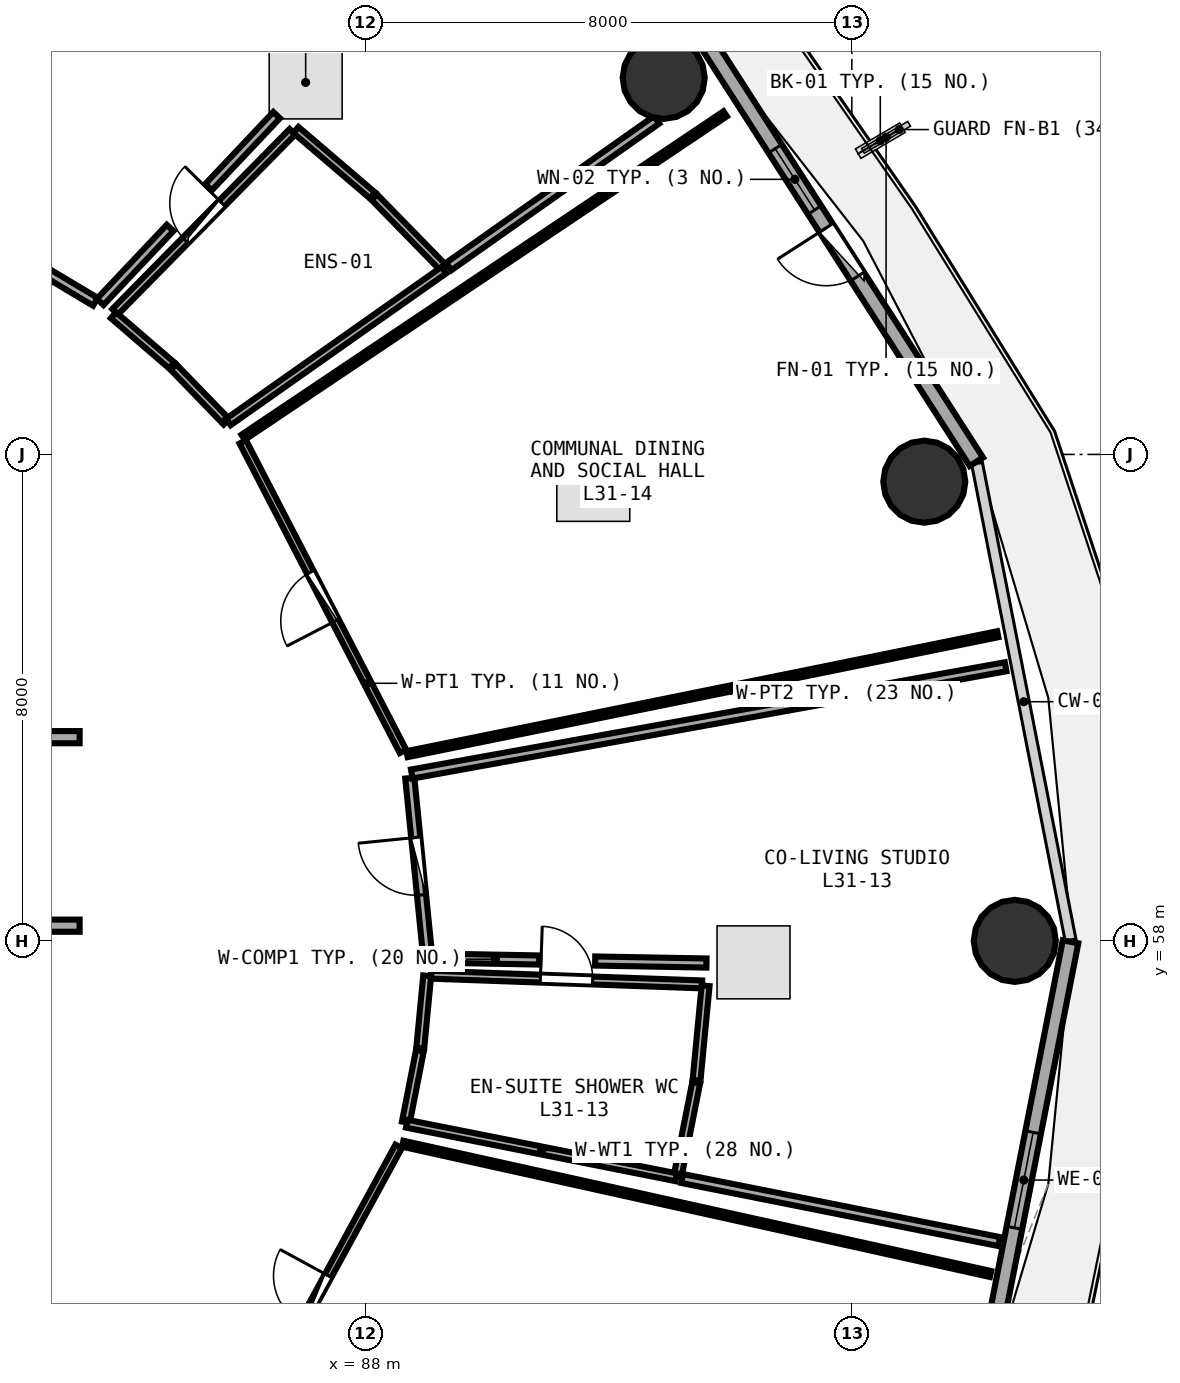
"""IFC4 building model, lengths in metres.
Left out: names, types, materials, properties, quantities, classifications, styles, units other than length and angle.
Written with IfcOpenShell. Run it as: python <this file> out.ifc"""

import sys

from ifc_helpers import new_model, si_unit, direction, frame, frame_2d, origin, origin_2d, place, context, subcontext, project, spatial, rectangle, circle, extrude, element, fill, save


model = new_model("IFC4")
c1 = context("Model", 3, precision=1e-05, world=origin(), true_north=direction((0.0, 1.0)))
c2 = subcontext(c1, "Body", "Model", "MODEL_VIEW")
j1 = project(units=[si_unit("LENGTHUNIT", "METRE"), si_unit("PLANEANGLEUNIT", "RADIAN")], contexts=[c1])
p1 = place(None, origin())
s1 = spatial("IfcSite", under=j1, at=p1, CompositionType="ELEMENT")
p2 = place(p1, origin())
s2 = spatial("IfcBuilding", under=s1, at=p2, CompositionType="ELEMENT")
p3 = place(p2, frame((0.0, 0.0, 121.35)))
s3 = spatial("IfcBuildingStorey", under=s2, at=p3, CompositionType="ELEMENT", Elevation=121.35)
for number, where, z_axis, x_axis in (
    (1, (98.68, 58.0, 0.0), (0.0, 0.0, 1.0), (1.0, 0.0, 0.0)),
    (2, (97.192, 65.552, 0.0), (0.0, 0.0, 1.0), (1.0, 0.0, 0.0)),
    (3, (92.906, 72.193, 0.0), (0.0, 0.0, 1.0), (1.0, 0.0, 0.0)),
):
    element("IfcColumn", number, at=place(p3, frame(where, z_axis=z_axis, x_axis=x_axis)), inside=s3, PredefinedType="COLUMN", context=c2, shape_type="SweptSolid", body=[
        extrude(circle(Radius=0.675, at=origin_2d()), origin(), (0.0, 0.0, 1.0), 3.75),
    ])
p4 = place(p3, frame((98.048, 65.879, 0.0), z_axis=(0.0, 0.0, 1.0), x_axis=(-0.540620528459, 0.841266571432, 0.0)))
e4 = element("IfcWall", 4, at=p4, inside=s3, PredefinedType="SOLIDWALL", context=c2, shape_type="SweptSolid", body=[
    extrude(rectangle(XDim=8.193, YDim=0.26, at=frame_2d((4.096, 0.0))), origin(), (0.0, 0.0, 1.0), 3.475),
])
p5 = place(p4, frame((3.621, 0.0, 0.0)))
e5 = element("IfcOpeningElement", 5, at=p5, cuts=e4, PredefinedType="OPENING", context=c2, shape_type="SweptSolid", body=[
    extrude(rectangle(XDim=0.95, YDim=2.1, at=frame_2d((0.475, 1.05))), frame((0.0, 0.14, 0.0), z_axis=(0.0, -1.0, 0.0), x_axis=(1.0, 0.0, 0.0)), (0.0, 0.0, 1.0), 0.28),
])
p6 = place(p4, frame((4.921, 0.0, 0.85)))
e6 = element("IfcOpeningElement", 6, at=p6, cuts=e4, PredefinedType="OPENING", context=c2, shape_type="SweptSolid", body=[
    extrude(rectangle(XDim=1.2, YDim=1.45, at=frame_2d((0.6, 0.725))), frame((0.0, 0.14, 0.0), z_axis=(0.0, -1.0, 0.0), x_axis=(1.0, 0.0, 0.0)), (0.0, 0.0, 1.0), 0.28),
])
p7 = place(p3, frame((98.059, 50.148, 0.0), z_axis=(0.0, 0.0, 1.0), x_axis=(0.192581843632, 0.981280914674, 0.0)))
e7 = element("IfcWall", 7, at=p7, inside=s3, PredefinedType="SOLIDWALL", context=c2, shape_type="SweptSolid", body=[
    extrude(rectangle(XDim=7.987, YDim=0.26, at=frame_2d((3.993, 0.0))), origin(), (0.0, 0.0, 1.0), 3.475),
])
p8 = place(p7, frame((3.193, 0.0, 0.85)))
e8 = element("IfcOpeningElement", 8, at=p8, cuts=e7, PredefinedType="OPENING", context=c2, shape_type="SweptSolid", body=[
    extrude(rectangle(XDim=1.6, YDim=1.45, at=frame_2d((0.8, 0.725))), frame((0.0, 0.14, 0.0), z_axis=(0.0, -1.0, 0.0), x_axis=(1.0, 0.0, 0.0)), (0.0, 0.0, 1.0), 0.28),
])
p9 = place(p3, frame((79.3, 61.35, 0.0), z_axis=(0.0, 0.0, 1.0), x_axis=(1.0, 0.0, 0.0)))
e9 = element("IfcWall", 9, at=p9, inside=s3, PredefinedType="SOLIDWALL", context=c2, shape_type="SweptSolid", body=[
    extrude(rectangle(XDim=4.0, YDim=0.2, at=frame_2d((2.0, 0.0))), origin(), (0.0, 0.0, 1.0), 2.775),
])
p10 = place(p9, frame((0.45, 0.0, 0.0)))
e10 = element("IfcOpeningElement", 10, at=p10, cuts=e9, PredefinedType="OPENING", context=c2, shape_type="SweptSolid", body=[
    extrude(rectangle(XDim=1.2, YDim=2.15, at=frame_2d((0.6, 1.075))), frame((0.0, 0.11, 0.0), z_axis=(0.0, -1.0, 0.0), x_axis=(1.0, 0.0, 0.0)), (0.0, 0.0, 1.0), 0.22),
])
p11 = place(p3, frame((79.3, 58.25, 0.0), z_axis=(0.0, 0.0, 1.0), x_axis=(1.0, 0.0, 0.0)))
e11 = element("IfcWall", 11, at=p11, inside=s3, PredefinedType="SOLIDWALL", context=c2, shape_type="SweptSolid", body=[
    extrude(rectangle(XDim=4.0, YDim=0.2, at=frame_2d((2.0, 0.0))), origin(), (0.0, 0.0, 1.0), 2.775),
])
p12 = place(p11, frame((0.5, 0.0, 0.0)))
e12 = element("IfcOpeningElement", 12, at=p12, cuts=e11, PredefinedType="OPENING", context=c2, shape_type="SweptSolid", body=[
    extrude(rectangle(XDim=1.1, YDim=2.1, at=frame_2d((0.55, 1.05))), frame((0.0, 0.11, 0.0), z_axis=(0.0, -1.0, 0.0), x_axis=(1.0, 0.0, 0.0)), (0.0, 0.0, 1.0), 0.22),
])
p13 = place(p3, frame((83.883, 68.345, 0.0), z_axis=(0.0, 0.0, 1.0), x_axis=(0.70168270288, 0.712489567979, 0.0)))
e13 = element("IfcWall", 13, at=p13, inside=s3, PredefinedType="PLUMBINGWALL", context=c2, shape_type="SweptSolid", body=[
    extrude(rectangle(XDim=4.157, YDim=0.13, at=frame_2d((2.078, 0.0))), origin(), (0.0, 0.0, 1.0), 3.175),
])
p14 = place(p13, frame((1.648, 0.0, 0.0)))
e14 = element("IfcOpeningElement", 14, at=p14, cuts=e13, PredefinedType="OPENING", context=c2, shape_type="SweptSolid", body=[
    extrude(rectangle(XDim=0.86, YDim=2.05, at=frame_2d((0.43, 1.025))), frame((0.0, 0.075, 0.0), z_axis=(0.0, -1.0, 0.0), x_axis=(1.0, 0.0, 0.0)), (0.0, 0.0, 1.0), 0.15),
])
p15 = place(p3, frame((83.56, 68.51, 0.0), z_axis=(0.0, 0.0, 1.0), x_axis=(-0.858523244826, 0.512774646501, 0.0)))
e15 = element("IfcWall", 15, at=p15, inside=s3, PredefinedType="PARTITIONING", context=c2, shape_type="SweptSolid", body=[
    extrude(rectangle(XDim=3.131, YDim=0.15, at=frame_2d((1.565, 0.0))), origin(), (0.0, 0.0, 1.0), 2.925),
])
p16 = place(p15, frame((1.09, 0.0, 0.0)))
e16 = element("IfcOpeningElement", 16, at=p16, cuts=e15, PredefinedType="OPENING", context=c2, shape_type="SweptSolid", body=[
    extrude(rectangle(XDim=0.95, YDim=2.08, at=frame_2d((0.475, 1.04))), frame((0.0, 0.085, 0.0), z_axis=(0.0, -1.0, 0.0), x_axis=(1.0, 0.0, 0.0)), (0.0, 0.0, 1.0), 0.17),
])
p17 = place(p3, frame((85.801, 49.579, 0.0), z_axis=(0.0, 0.0, 1.0), x_axis=(0.478256103777, 0.878220416069, 0.0)))
e17 = element("IfcWall", 17, at=p17, inside=s3, PredefinedType="PARTITIONING", context=c2, shape_type="SweptSolid", body=[
    extrude(rectangle(XDim=5.741, YDim=0.12, at=frame_2d((2.871, 0.0))), origin(), (0.0, 0.0, 1.0), 2.925),
])
p18 = place(p17, frame((2.42, 0.0, 0.0)))
e18 = element("IfcOpeningElement", 18, at=p18, cuts=e17, PredefinedType="OPENING", context=c2, shape_type="SweptSolid", body=[
    extrude(rectangle(XDim=0.9, YDim=2.08, at=frame_2d((0.45, 1.04))), frame((0.0, 0.07, 0.0), z_axis=(0.0, -1.0, 0.0), x_axis=(1.0, 0.0, 0.0)), (0.0, 0.0, 1.0), 0.14),
])
p19 = place(p3, frame((89.078, 57.444, 0.0), z_axis=(0.0, 0.0, 1.0), x_axis=(0.999359574241, -0.035783255492, 0.0)))
e19 = element("IfcWall", 19, at=p19, inside=s3, PredefinedType="PLUMBINGWALL", context=c2, shape_type="SweptSolid", body=[
    extrude(rectangle(XDim=4.462, YDim=0.13, at=frame_2d((2.231, 0.0))), origin(), (0.0, 0.0, 1.0), 3.175),
])
p20 = place(p19, frame((1.801, 0.0, 0.0)))
e20 = element("IfcOpeningElement", 20, at=p20, cuts=e19, PredefinedType="OPENING", context=c2, shape_type="SweptSolid", body=[
    extrude(rectangle(XDim=0.86, YDim=2.05, at=frame_2d((0.43, 1.025))), frame((0.0, 0.075, 0.0), z_axis=(0.0, -1.0, 0.0), x_axis=(1.0, 0.0, 0.0)), (0.0, 0.0, 1.0), 0.15),
])
p21 = place(p3, frame((89.021, 57.779, 0.0), z_axis=(0.0, 0.0, 1.0), x_axis=(-0.099902017985, 0.994997279797, 0.0)))
e21 = element("IfcWall", 21, at=p21, inside=s3, PredefinedType="PARTITIONING", context=c2, shape_type="SweptSolid", body=[
    extrude(rectangle(XDim=2.913, YDim=0.15, at=frame_2d((1.457, 0.0))), origin(), (0.0, 0.0, 1.0), 2.925),
])
p22 = place(p21, frame((0.982, 0.0, 0.0)))
e22 = element("IfcOpeningElement", 22, at=p22, cuts=e21, PredefinedType="OPENING", context=c2, shape_type="SweptSolid", body=[
    extrude(rectangle(XDim=0.95, YDim=2.08, at=frame_2d((0.475, 1.04))), frame((0.0, 0.085, 0.0), z_axis=(0.0, -1.0, 0.0), x_axis=(1.0, 0.0, 0.0)), (0.0, 0.0, 1.0), 0.17),
])
p23 = place(p3, frame((88.618, 61.116, 0.0), z_axis=(0.0, 0.0, 1.0), x_axis=(-0.459658120373, 0.88809594773, 0.0)))
e23 = element("IfcWall", 23, at=p23, inside=s3, PredefinedType="PARTITIONING", context=c2, shape_type="SweptSolid", body=[
    extrude(rectangle(XDim=5.732, YDim=0.12, at=frame_2d((2.866, 0.0))), origin(), (0.0, 0.0, 1.0), 2.925),
])
p24 = place(p23, frame((2.416, 0.0, 0.0)))
e24 = element("IfcOpeningElement", 24, at=p24, cuts=e23, PredefinedType="OPENING", context=c2, shape_type="SweptSolid", body=[
    extrude(rectangle(XDim=0.9, YDim=2.08, at=frame_2d((0.45, 1.04))), frame((0.0, 0.07, 0.0), z_axis=(0.0, -1.0, 0.0), x_axis=(1.0, 0.0, 0.0)), (0.0, 0.0, 1.0), 0.14),
])
p25 = place(p3, frame((85.716, 66.536, 0.0), z_axis=(0.0, 0.0, 1.0), x_axis=(-0.695817197704, 0.718218927194, 0.0)))
e25 = element("IfcWall", 25, at=p25, inside=s3, PredefinedType="PLUMBINGWALL", context=c2, shape_type="SweptSolid", body=[
    extrude(rectangle(XDim=1.253, YDim=0.13, at=frame_2d((0.627, 0.0))), origin(), (0.0, 0.0, 1.0), 2.925),
])
p26 = place(p3, frame((84.815, 67.464, 0.0), z_axis=(0.0, 0.0, 1.0), x_axis=(-0.757933178543, 0.652332198242, 0.0)))
e26 = element("IfcWall", 26, at=p26, inside=s3, PredefinedType="PLUMBINGWALL", context=c2, shape_type="SweptSolid", body=[
    extrude(rectangle(XDim=1.265, YDim=0.13, at=frame_2d((0.632, 0.0))), origin(), (0.0, 0.0, 1.0), 3.48),
])
p27 = place(p3, frame((86.857, 71.336, 0.0), z_axis=(0.0, 0.0, 1.0), x_axis=(0.760056789813, -0.649856658241, 0.0)))
e27 = element("IfcWall", 27, at=p27, inside=s3, PredefinedType="PLUMBINGWALL", context=c2, shape_type="SweptSolid", body=[
    extrude(rectangle(XDim=1.657, YDim=0.13, at=frame_2d((0.829, 0.0))), origin(), (0.0, 0.0, 1.0), 3.48),
])
p28 = place(p3, frame((88.146, 70.232, 0.0), z_axis=(0.0, 0.0, 1.0), x_axis=(0.698431593966, -0.715676818508, 0.0)))
e28 = element("IfcWall", 28, at=p28, inside=s3, PredefinedType="PLUMBINGWALL", context=c2, shape_type="SweptSolid", body=[
    extrude(rectangle(XDim=1.642, YDim=0.13, at=frame_2d((0.821, 0.0))), origin(), (0.0, 0.0, 1.0), 2.925),
])
p29 = place(p3, frame((89.291, 69.031, 0.0), z_axis=(0.0, 0.0, 1.0), x_axis=(-0.817498099131, -0.575931296178, 0.0)))
e29 = element("IfcWall", 29, at=p29, inside=s3, PredefinedType="PLUMBINGWALL", context=c2, shape_type="SweptSolid", body=[
    extrude(rectangle(XDim=4.336, YDim=0.13, at=frame_2d((2.168, 0.0))), origin(), (0.0, 0.0, 1.0), 3.175),
])
p30 = place(p3, frame((80.84, 70.181, 0.0), z_axis=(0.0, 0.0, 1.0), x_axis=(0.500668535271, 0.865639080558, 0.0)))
e30 = element("IfcWall", 30, at=p30, inside=s3, PredefinedType="PARTITIONING", context=c2, shape_type="SweptSolid", body=[
    extrude(rectangle(XDim=9.03, YDim=0.15, at=frame_2d((4.515, 0.0))), origin(), (0.0, 0.0, 1.0), 2.925),
])
p31 = place(p3, frame((92.79, 71.502, 0.0), z_axis=(0.0, 0.0, 1.0), x_axis=(-0.817102044885, -0.576493060015, 0.0)))
e31 = element("IfcWall", 31, at=p31, inside=s3, PredefinedType="PARTITIONING", context=c2, shape_type="SweptSolid", body=[
    extrude(rectangle(XDim=4.185, YDim=0.15, at=frame_2d((2.092, 0.0))), origin(), (0.0, 0.0, 1.0), 3.235),
])
p32 = place(p3, frame((86.54, 71.58, 0.0), z_axis=(0.0, 0.0, 1.0), x_axis=(-0.68661474407, -0.727021453071, 0.0)))
e32 = element("IfcWall", 32, at=p32, inside=s3, PredefinedType="PARTITIONING", context=c2, shape_type="SweptSolid", body=[
    extrude(rectangle(XDim=1.631, YDim=0.15, at=frame_2d((0.816, 0.0))), origin(), (0.0, 0.0, 1.0), 3.175),
])
p33 = place(p3, frame((84.788, 69.725, 0.0), z_axis=(0.0, 0.0, 1.0), x_axis=(-0.686614966265, -0.727021243226, 0.0)))
e33 = element("IfcWall", 33, at=p33, inside=s3, PredefinedType="PARTITIONING", context=c2, shape_type="SweptSolid", body=[
    extrude(rectangle(XDim=1.674, YDim=0.15, at=frame_2d((0.837, 0.0))), origin(), (0.0, 0.0, 1.0), 3.235),
])
p34 = place(p3, frame((84.812, 78.241, 0.0), z_axis=(0.0, 0.0, 1.0), x_axis=(-0.477645693392, -0.878552554822, 0.0)))
e34 = element("IfcWall", 34, at=p34, inside=s3, PredefinedType="PARTITIONING", context=c2, shape_type="SweptSolid", body=[
    extrude(rectangle(XDim=9.007, YDim=0.1, at=frame_2d((4.503, 0.0))), origin(), (0.0, 0.0, 1.0), 2.925),
])
p35 = place(p3, frame((88.614, 54.664, 0.0), z_axis=(0.0, 0.0, 1.0), x_axis=(0.976312199438, -0.216366562178, 0.0)))
e35 = element("IfcWall", 35, at=p35, inside=s3, PredefinedType="PARTITIONING", context=c2, shape_type="SweptSolid", body=[
    extrude(rectangle(XDim=9.903, YDim=0.1, at=frame_2d((4.951, 0.0))), origin(), (0.0, 0.0, 1.0), 2.975),
])
p36 = place(p3, frame((88.665, 55.017, 0.0), z_axis=(0.0, 0.0, 1.0), x_axis=(0.192633384292, 0.981270798127, 0.0)))
e36 = element("IfcWall", 36, at=p36, inside=s3, PredefinedType="PLUMBINGWALL", context=c2, shape_type="SweptSolid", body=[
    extrude(rectangle(XDim=1.2, YDim=0.13, at=frame_2d((0.6, 0.0))), origin(), (0.0, 0.0, 1.0), 3.48),
])
p37 = place(p3, frame((88.902, 56.234, 0.0), z_axis=(0.0, 0.0, 1.0), x_axis=(0.095405531976, 0.995438488541, 0.0)))
e37 = element("IfcWall", 37, at=p37, inside=s3, PredefinedType="PLUMBINGWALL", context=c2, shape_type="SweptSolid", body=[
    extrude(rectangle(XDim=1.198, YDim=0.13, at=frame_2d((0.599, 0.0))), origin(), (0.0, 0.0, 1.0), 3.48),
])
p38 = place(p3, frame((93.595, 57.262, 0.0), z_axis=(0.0, 0.0, 1.0), x_axis=(-0.095560666353, -0.995423607841, 0.0)))
e38 = element("IfcWall", 38, at=p38, inside=s3, PredefinedType="PLUMBINGWALL", context=c2, shape_type="SweptSolid", body=[
    extrude(rectangle(XDim=1.563, YDim=0.13, at=frame_2d((0.782, 0.0))), origin(), (0.0, 0.0, 1.0), 3.48),
])
p39 = place(p3, frame((93.44, 55.667, 0.0), z_axis=(0.0, 0.0, 1.0), x_axis=(-0.194648564843, -0.980873047955, 0.0)))
e39 = element("IfcWall", 39, at=p39, inside=s3, PredefinedType="PLUMBINGWALL", context=c2, shape_type="SweptSolid", body=[
    extrude(rectangle(XDim=1.568, YDim=0.13, at=frame_2d((0.784, 0.0))), origin(), (0.0, 0.0, 1.0), 3.48),
])
p40 = place(p3, frame((93.111, 54.113, 0.0), z_axis=(0.0, 0.0, 1.0), x_axis=(-0.980825194025, 0.194889555304, 0.0)))
e40 = element("IfcWall", 40, at=p40, inside=s3, PredefinedType="PLUMBINGWALL", context=c2, shape_type="SweptSolid", body=[
    extrude(rectangle(XDim=4.517, YDim=0.13, at=frame_2d((2.259, 0.0))), origin(), (0.0, 0.0, 1.0), 3.175),
])
p41 = place(p3, frame((88.763, 60.744, 0.0), z_axis=(0.0, 0.0, 1.0), x_axis=(0.984081766615, 0.177716281237, 0.0)))
e41 = element("IfcWall", 41, at=p41, inside=s3, PredefinedType="PARTITIONING", context=c2, shape_type="SweptSolid", body=[
    extrude(rectangle(XDim=9.924, YDim=0.15, at=frame_2d((4.962, 0.0))), origin(), (0.0, 0.0, 1.0), 2.975),
])
p42 = place(p3, frame((98.425, 53.055, 0.0), z_axis=(0.0, 0.0, 1.0), x_axis=(-0.980779700981, 0.195118369572, 0.0)))
e42 = element("IfcWall", 42, at=p42, inside=s3, PredefinedType="PARTITIONING", context=c2, shape_type="SweptSolid", body=[
    extrude(rectangle(XDim=5.318, YDim=0.15, at=frame_2d((2.659, 0.0))), origin(), (0.0, 0.0, 1.0), 2.975),
])
p43 = place(p3, frame((93.609, 57.636, 0.0), z_axis=(0.0, 0.0, 1.0), x_axis=(-0.999835456222, 0.018140024286, 0.0)))
e43 = element("IfcWall", 43, at=p43, inside=s3, PredefinedType="PARTITIONING", context=c2, shape_type="SweptSolid", body=[
    extrude(rectangle(XDim=1.83, YDim=0.15, at=frame_2d((0.915, 0.0))), origin(), (0.0, 0.0, 1.0), 3.175),
])
p44 = place(p3, frame((90.859, 57.686, 0.0), z_axis=(0.0, 0.0, 1.0), x_axis=(-0.999835980019, 0.018111130838, 0.0)))
e44 = element("IfcWall", 44, at=p44, inside=s3, PredefinedType="PARTITIONING", context=c2, shape_type="SweptSolid", body=[
    extrude(rectangle(XDim=1.442, YDim=0.15, at=frame_2d((0.721, 0.0))), origin(), (0.0, 0.0, 1.0), 3.48),
])
p45 = place(p3, frame((85.989, 66.282, 0.0), z_axis=(0.0, 0.0, 1.0), x_axis=(0.830433607217, 0.557117603388, 0.0)))
e45 = element("IfcWall", 45, at=p45, inside=s3, PredefinedType="PARTITIONING", context=c2, shape_type="SweptSolid", body=[
    extrude(rectangle(XDim=9.546, YDim=0.1, at=frame_2d((4.773, 0.0))), origin(), (0.0, 0.0, 1.0), 2.975),
])
p46 = place(p3, frame((98.4, 63.043, 0.0), z_axis=(0.0, 0.0, 1.0), x_axis=(-0.980013960975, -0.198928721641, 0.0)))
e46 = element("IfcWall", 46, at=p46, inside=s3, PredefinedType="PARTITIONING", context=c2, shape_type="SweptSolid", body=[
    extrude(rectangle(XDim=9.913, YDim=0.1, at=frame_2d((4.956, 0.0))), origin(), (0.0, 0.0, 1.0), 2.975),
])
p47 = place(p5, frame((0.95, 0.0, 0.0), z_axis=(0.0, 0.0, 1.0), x_axis=(-1.0, 0.0, 0.0)))
e47 = element("IfcDoor", 47, at=p47, inside=s3, OperationType="SINGLE_SWING_LEFT", PredefinedType="DOOR", context=c2, shape_type="SweptSolid", body=[
    extrude(rectangle(XDim=0.95, YDim=2.1, at=frame_2d((0.475, 1.05))), frame((0.0, 0.025, 0.0), z_axis=(0.0, -1.0, 0.0), x_axis=(1.0, 0.0, 0.0)), (0.0, 0.0, 1.0), 0.05),
])
fill(e5, e47)
p48 = place(p6, origin())
e48 = element("IfcWindow", 48, at=p48, inside=s3, PartitioningType="SINGLE_PANEL", PredefinedType="WINDOW", context=c2, shape_type="SweptSolid", body=[
    extrude(rectangle(XDim=1.2, YDim=1.45, at=frame_2d((0.6, 0.725))), frame((0.0, 0.03, 0.0), z_axis=(0.0, -1.0, 0.0), x_axis=(1.0, 0.0, 0.0)), (0.0, 0.0, 1.0), 0.06),
])
fill(e6, e48)
p49 = place(p8, origin())
e49 = element("IfcWindow", 49, at=p49, inside=s3, PartitioningType="SINGLE_PANEL", PredefinedType="WINDOW", context=c2, shape_type="SweptSolid", body=[
    extrude(rectangle(XDim=1.6, YDim=1.45, at=frame_2d((0.8, 0.725))), frame((0.0, 0.03, 0.0), z_axis=(0.0, -1.0, 0.0), x_axis=(1.0, 0.0, 0.0)), (0.0, 0.0, 1.0), 0.06),
])
fill(e8, e49)
p50 = place(p14, origin())
e50 = element("IfcDoor", 50, at=p50, inside=s3, OperationType="SINGLE_SWING_RIGHT", PredefinedType="DOOR", context=c2, shape_type="SweptSolid", body=[
    extrude(rectangle(XDim=0.86, YDim=2.05, at=frame_2d((0.43, 1.025))), frame((0.0, 0.025, 0.0), z_axis=(0.0, -1.0, 0.0), x_axis=(1.0, 0.0, 0.0)), (0.0, 0.0, 1.0), 0.05),
])
fill(e14, e50)
p51 = place(p18, origin())
e51 = element("IfcDoor", 51, at=p51, inside=s3, OperationType="SINGLE_SWING_RIGHT", PredefinedType="DOOR", context=c2, shape_type="SweptSolid", body=[
    extrude(rectangle(XDim=0.9, YDim=2.08, at=frame_2d((0.45, 1.04))), frame((0.0, 0.025, 0.0), z_axis=(0.0, -1.0, 0.0), x_axis=(1.0, 0.0, 0.0)), (0.0, 0.0, 1.0), 0.05),
])
fill(e18, e51)
p52 = place(p20, origin())
e52 = element("IfcDoor", 52, at=p52, inside=s3, OperationType="SINGLE_SWING_LEFT", PredefinedType="DOOR", context=c2, shape_type="SweptSolid", body=[
    extrude(rectangle(XDim=0.86, YDim=2.05, at=frame_2d((0.43, 1.025))), frame((0.0, 0.025, 0.0), z_axis=(0.0, -1.0, 0.0), x_axis=(1.0, 0.0, 0.0)), (0.0, 0.0, 1.0), 0.05),
])
fill(e20, e52)
p53 = place(p22, origin())
e53 = element("IfcDoor", 53, at=p53, inside=s3, OperationType="SINGLE_SWING_RIGHT", PredefinedType="DOOR", context=c2, shape_type="SweptSolid", body=[
    extrude(rectangle(XDim=0.95, YDim=2.08, at=frame_2d((0.475, 1.04))), frame((0.0, 0.025, 0.0), z_axis=(0.0, -1.0, 0.0), x_axis=(1.0, 0.0, 0.0)), (0.0, 0.0, 1.0), 0.05),
])
fill(e22, e53)
p54 = place(p24, origin())
e54 = element("IfcDoor", 54, at=p54, inside=s3, OperationType="SINGLE_SWING_LEFT", PredefinedType="DOOR", context=c2, shape_type="SweptSolid", body=[
    extrude(rectangle(XDim=0.9, YDim=2.08, at=frame_2d((0.45, 1.04))), frame((0.0, 0.025, 0.0), z_axis=(0.0, -1.0, 0.0), x_axis=(1.0, 0.0, 0.0)), (0.0, 0.0, 1.0), 0.05),
])
fill(e24, e54)
save(model, sys.argv[1])
